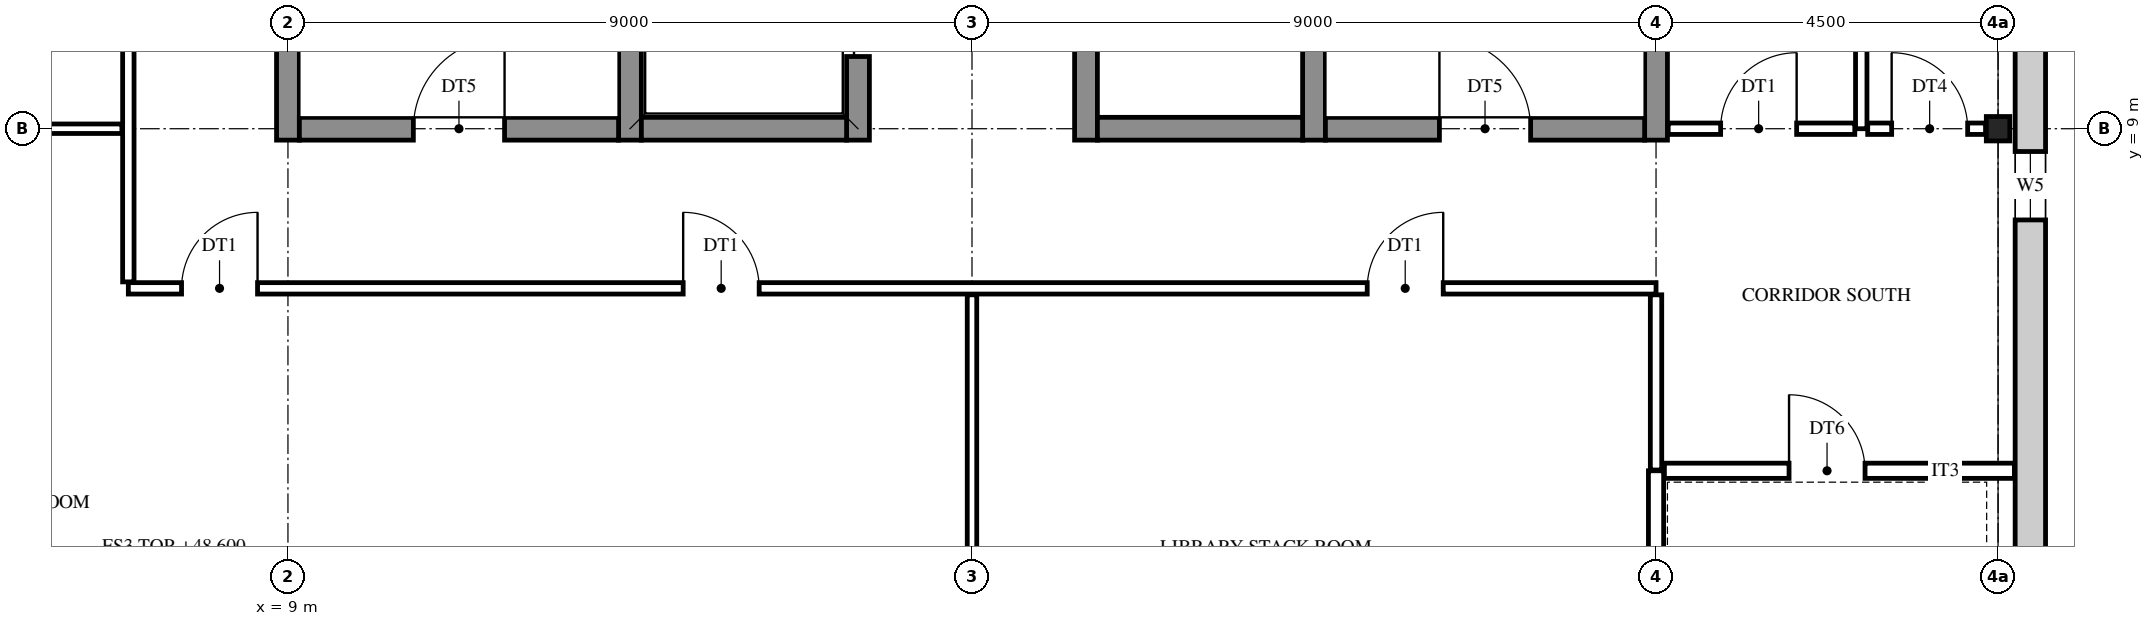
"""IFC4 building model, lengths in metres.
Left out: names, types, materials, properties, quantities, classifications, styles, units other than length and angle.
Written with IfcOpenShell. Run it as: python <this file> out.ifc"""

import sys

from ifc_helpers import new_model, si_unit, direction, frame, frame_2d, origin, origin_2d, place, context, subcontext, project, spatial, rectangle, i_section, extrude, element, fill, save


model = new_model("IFC4")
c1 = context("Model", 3, precision=1e-05, world=origin(), true_north=direction((0.0, 1.0)))
c2 = subcontext(c1, "Body", "Model", "MODEL_VIEW")
j1 = project(units=[si_unit("LENGTHUNIT", "METRE"), si_unit("PLANEANGLEUNIT", "RADIAN")], contexts=[c1])
p1 = place(None, origin())
s1 = spatial("IfcSite", under=j1, at=p1, CompositionType="ELEMENT")
p2 = place(p1, origin())
s2 = spatial("IfcBuilding", under=s1, at=p2, CompositionType="ELEMENT")
p3 = place(p2, frame((0.0, 0.0, 48.6)))
s3 = spatial("IfcBuildingStorey", under=s2, at=p3, CompositionType="ELEMENT", Elevation=48.6)
p4 = place(p3, frame((31.5, 9.0, 0.0), z_axis=(0.0, 0.0, 1.0), x_axis=(1.0, 0.0, 0.0)))
e1 = element("IfcColumn", 1, at=p4, inside=s3, PredefinedType="COLUMN", context=c2, shape_type="SweptSolid", body=[
    extrude(i_section(OverallWidth=0.309, OverallDepth=0.321, WebThickness=0.014, FlangeThickness=0.022, FilletRadius=0.017, at=origin_2d()), origin(), (0.0, 0.0, 1.0), 4.2),
])
for number, where, z_axis, x_axis in (
    (2, (9.0, 8.85, 0.0), (0.0, 0.0, 1.0), (0.0, 1.0, 0.0)),
    (3, (13.5, 8.85, 0.0), (0.0, 0.0, 1.0), (0.0, 1.0, 0.0)),
):
    element("IfcWall", number, at=place(p3, frame(where, z_axis=z_axis, x_axis=x_axis)), inside=s3, PredefinedType="SHEAR", context=c2, shape_type="SweptSolid", body=[
        extrude(rectangle(XDim=9.3, YDim=0.3, at=frame_2d((4.65, 0.0))), origin(), (0.0, 0.0, 1.0), 4.2),
    ])
p5 = place(p3, frame((16.5, 8.85, 0.0), z_axis=(0.0, 0.0, 1.0), x_axis=(0.0, 1.0, 0.0)))
e4 = element("IfcWall", 4, at=p5, inside=s3, PredefinedType="SHEAR", context=c2, shape_type="SweptSolid", body=[
    extrude(rectangle(XDim=9.3, YDim=0.3, at=frame_2d((4.65, 0.0))), origin(), (0.0, 0.0, 1.0), 4.2),
])
p6 = place(p5, frame((1.1, 0.0, 0.0)))
e5 = element("IfcOpeningElement", 5, at=p6, cuts=e4, PredefinedType="OPENING", context=c2, shape_type="SweptSolid", body=[
    extrude(rectangle(XDim=1.1, YDim=2.1, at=frame_2d((0.55, 1.05))), frame((0.0, 0.16, 0.0), z_axis=(0.0, -1.0, 0.0), x_axis=(1.0, 0.0, 0.0)), (0.0, 0.0, 1.0), 0.32),
])
p7 = place(p5, frame((4.1, 0.0, 0.0)))
e6 = element("IfcOpeningElement", 6, at=p7, cuts=e4, PredefinedType="OPENING", context=c2, shape_type="SweptSolid", body=[
    extrude(rectangle(XDim=1.1, YDim=2.1, at=frame_2d((0.55, 1.05))), frame((0.0, 0.16, 0.0), z_axis=(0.0, -1.0, 0.0), x_axis=(1.0, 0.0, 0.0)), (0.0, 0.0, 1.0), 0.32),
])
p8 = place(p3, frame((19.5, 8.85, 0.0), z_axis=(0.0, 0.0, 1.0), x_axis=(0.0, 1.0, 0.0)))
e7 = element("IfcWall", 7, at=p8, inside=s3, PredefinedType="SHEAR", context=c2, shape_type="SweptSolid", body=[
    extrude(rectangle(XDim=9.3, YDim=0.3, at=frame_2d((4.65, 0.0))), origin(), (0.0, 0.0, 1.0), 4.2),
])
p9 = place(p8, frame((3.95, 0.0, 0.0)))
e8 = element("IfcOpeningElement", 8, at=p9, cuts=e7, PredefinedType="OPENING", context=c2, shape_type="SweptSolid", body=[
    extrude(rectangle(XDim=1.4, YDim=2.1, at=frame_2d((0.7, 1.05))), frame((0.0, 0.16, 0.0), z_axis=(0.0, -1.0, 0.0), x_axis=(1.0, 0.0, 0.0)), (0.0, 0.0, 1.0), 0.32),
])
p10 = place(p8, frame((7.1, 0.0, 0.0)))
e9 = element("IfcOpeningElement", 9, at=p10, cuts=e7, PredefinedType="OPENING", context=c2, shape_type="SweptSolid", body=[
    extrude(rectangle(XDim=1.1, YDim=2.1, at=frame_2d((0.55, 1.05))), frame((0.0, 0.16, 0.0), z_axis=(0.0, -1.0, 0.0), x_axis=(1.0, 0.0, 0.0)), (0.0, 0.0, 1.0), 0.32),
])
for number, where, z_axis, x_axis in (
    (10, (22.5, 8.85, 0.0), (0.0, 0.0, 1.0), (0.0, 1.0, 0.0)),
    (11, (27.0, 8.85, 0.0), (0.0, 0.0, 1.0), (0.0, 1.0, 0.0)),
):
    element("IfcWall", number, at=place(p3, frame(where, z_axis=z_axis, x_axis=x_axis)), inside=s3, PredefinedType="SHEAR", context=c2, shape_type="SweptSolid", body=[
        extrude(rectangle(XDim=9.3, YDim=0.3, at=frame_2d((4.65, 0.0))), origin(), (0.0, 0.0, 1.0), 4.2),
    ])
p11 = place(p3, frame((9.15, 9.0, 0.0), z_axis=(0.0, 0.0, 1.0), x_axis=(1.0, 0.0, 0.0)))
e12 = element("IfcWall", 12, at=p11, inside=s3, PredefinedType="SHEAR", context=c2, shape_type="SweptSolid", body=[
    extrude(rectangle(XDim=4.2, YDim=0.3, at=frame_2d((2.1, 0.0))), origin(), (0.0, 0.0, 1.0), 4.2),
])
p12 = place(p11, frame((1.5, 0.0, 0.0)))
e13 = element("IfcOpeningElement", 13, at=p12, cuts=e12, PredefinedType="OPENING", context=c2, shape_type="SweptSolid", body=[
    extrude(rectangle(XDim=1.2, YDim=2.1, at=frame_2d((0.6, 1.05))), frame((0.0, 0.16, 0.0), z_axis=(0.0, -1.0, 0.0), x_axis=(1.0, 0.0, 0.0)), (0.0, 0.0, 1.0), 0.32),
])
for number, where, z_axis, x_axis in (
    (14, (13.65, 9.0, 0.0), (0.0, 0.0, 1.0), (1.0, 0.0, 0.0)),
    (15, (19.65, 9.0, 0.0), (0.0, 0.0, 1.0), (1.0, 0.0, 0.0)),
):
    element("IfcWall", number, at=place(p3, frame(where, z_axis=z_axis, x_axis=x_axis)), inside=s3, PredefinedType="SHEAR", context=c2, shape_type="SweptSolid", body=[
        extrude(rectangle(XDim=2.7, YDim=0.3, at=frame_2d((1.35, 0.0))), origin(), (0.0, 0.0, 1.0), 4.2),
    ])
p13 = place(p3, frame((22.65, 9.0, 0.0), z_axis=(0.0, 0.0, 1.0), x_axis=(1.0, 0.0, 0.0)))
e16 = element("IfcWall", 16, at=p13, inside=s3, PredefinedType="SHEAR", context=c2, shape_type="SweptSolid", body=[
    extrude(rectangle(XDim=4.2, YDim=0.3, at=frame_2d((2.1, 0.0))), origin(), (0.0, 0.0, 1.0), 4.2),
])
p14 = place(p13, frame((1.5, 0.0, 0.0)))
e17 = element("IfcOpeningElement", 17, at=p14, cuts=e16, PredefinedType="OPENING", context=c2, shape_type="SweptSolid", body=[
    extrude(rectangle(XDim=1.2, YDim=2.1, at=frame_2d((0.6, 1.05))), frame((0.0, 0.16, 0.0), z_axis=(0.0, -1.0, 0.0), x_axis=(1.0, 0.0, 0.0)), (0.0, 0.0, 1.0), 0.32),
])
p15 = place(p3, frame((31.925, 27.225, 0.0), z_axis=(0.0, 0.0, 1.0), x_axis=(0.0, -1.0, 0.0)))
e18 = element("IfcWall", 18, at=p15, inside=s3, PredefinedType="STANDARD", context=c2, shape_type="SweptSolid", body=[
    extrude(rectangle(XDim=27.45, YDim=0.4, at=frame_2d((13.725, 0.0))), origin(), (0.0, 0.0, 1.0), 4.2),
])
p16 = place(p15, frame((26.025, 0.0, 0.9)))
e19 = element("IfcOpeningElement", 19, at=p16, cuts=e18, PredefinedType="OPENING", context=c2, shape_type="SweptSolid", body=[
    extrude(rectangle(XDim=0.9, YDim=2.0, at=frame_2d((0.45, 1.0))), frame((0.0, 0.21, 0.0), z_axis=(0.0, -1.0, 0.0), x_axis=(1.0, 0.0, 0.0)), (0.0, 0.0, 1.0), 0.42),
])
p17 = place(p15, frame((18.525, 0.0, 0.9)))
e20 = element("IfcOpeningElement", 20, at=p17, cuts=e18, PredefinedType="OPENING", context=c2, shape_type="SweptSolid", body=[
    extrude(rectangle(XDim=0.9, YDim=2.0, at=frame_2d((0.45, 1.0))), frame((0.0, 0.21, 0.0), z_axis=(0.0, -1.0, 0.0), x_axis=(1.0, 0.0, 0.0)), (0.0, 0.0, 1.0), 0.42),
])
p18 = place(p15, frame((15.675, 0.0, 1.6)))
e21 = element("IfcOpeningElement", 21, at=p18, cuts=e18, PredefinedType="OPENING", context=c2, shape_type="SweptSolid", body=[
    extrude(rectangle(XDim=0.6, YDim=0.9, at=frame_2d((0.3, 0.45))), frame((0.0, 0.21, 0.0), z_axis=(0.0, -1.0, 0.0), x_axis=(1.0, 0.0, 0.0)), (0.0, 0.0, 1.0), 0.42),
])
p19 = place(p15, frame((11.175, 0.0, 1.6)))
e22 = element("IfcOpeningElement", 22, at=p19, cuts=e18, PredefinedType="OPENING", context=c2, shape_type="SweptSolid", body=[
    extrude(rectangle(XDim=0.6, YDim=0.9, at=frame_2d((0.3, 0.45))), frame((0.0, 0.21, 0.0), z_axis=(0.0, -1.0, 0.0), x_axis=(1.0, 0.0, 0.0)), (0.0, 0.0, 1.0), 0.42),
])
p20 = place(p15, frame((8.025, 0.0, 0.9)))
e23 = element("IfcOpeningElement", 23, at=p20, cuts=e18, PredefinedType="OPENING", context=c2, shape_type="SweptSolid", body=[
    extrude(rectangle(XDim=0.9, YDim=2.0, at=frame_2d((0.45, 1.0))), frame((0.0, 0.21, 0.0), z_axis=(0.0, -1.0, 0.0), x_axis=(1.0, 0.0, 0.0)), (0.0, 0.0, 1.0), 0.42),
])
p21 = place(p15, frame((0.525, 0.0, 0.9)))
e24 = element("IfcOpeningElement", 24, at=p21, cuts=e18, PredefinedType="OPENING", context=c2, shape_type="SweptSolid", body=[
    extrude(rectangle(XDim=0.9, YDim=2.0, at=frame_2d((0.45, 1.0))), frame((0.0, 0.21, 0.0), z_axis=(0.0, -1.0, 0.0), x_axis=(1.0, 0.0, 0.0)), (0.0, 0.0, 1.0), 0.42),
])
p22 = place(p3, frame((6.9, 6.985, 0.0), z_axis=(0.0, 0.0, 1.0), x_axis=(0.0, 1.0, 0.0)))
e25 = element("IfcWall", 25, at=p22, inside=s3, PredefinedType="PARTITIONING", context=c2, shape_type="SweptSolid", body=[
    extrude(rectangle(XDim=13.03, YDim=0.15, at=frame_2d((6.515, 0.0))), origin(), (0.0, 0.0, 1.0), 3.542),
])
p23 = place(p22, frame((5.965, 0.0, 0.0)))
e26 = element("IfcOpeningElement", 26, at=p23, cuts=e25, PredefinedType="OPENING", context=c2, shape_type="SweptSolid", body=[
    extrude(rectangle(XDim=1.1, YDim=2.1, at=frame_2d((0.55, 1.05))), frame((0.0, 0.085, 0.0), z_axis=(0.0, -1.0, 0.0), x_axis=(1.0, 0.0, 0.0)), (0.0, 0.0, 1.0), 0.17),
])
p24 = place(p3, frame((18.0, 0.17, 0.0), z_axis=(0.0, 0.0, 1.0), x_axis=(0.0, 1.0, 0.0)))
e27 = element("IfcWall", 27, at=p24, inside=s3, PredefinedType="PARTITIONING", context=c2, shape_type="SweptSolid", body=[
    extrude(rectangle(XDim=6.645, YDim=0.125, at=frame_2d((3.322, 0.0))), origin(), (0.0, 0.0, 1.0), 3.542),
])
p25 = place(p3, frame((27.0, 0.17, 0.0), z_axis=(0.0, 0.0, 1.0), x_axis=(0.0, 1.0, 0.0)))
e28 = element("IfcWall", 28, at=p25, inside=s3, PredefinedType="PARTITIONING", context=c2, shape_type="SweptSolid", body=[
    extrude(rectangle(XDim=4.33, YDim=0.2, at=frame_2d((2.165, 0.0))), origin(), (0.0, 0.0, 1.0), 3.542),
])
p26 = place(p3, frame((27.0, 4.51, 0.0), z_axis=(0.0, 0.0, 1.0), x_axis=(0.0, 1.0, 0.0)))
e29 = element("IfcWall", 29, at=p26, inside=s3, PredefinedType="PARTITIONING", context=c2, shape_type="SweptSolid", body=[
    extrude(rectangle(XDim=2.305, YDim=0.15, at=frame_2d((1.152, 0.0))), origin(), (0.0, 0.0, 1.0), 3.542),
])
p27 = place(p3, frame((29.7, 9.0, 0.0), z_axis=(0.0, 0.0, 1.0), x_axis=(0.0, 1.0, 0.0)))
e30 = element("IfcWall", 30, at=p27, inside=s3, PredefinedType="PARTITIONING", context=c2, shape_type="SweptSolid", body=[
    extrude(rectangle(XDim=6.3, YDim=0.15, at=frame_2d((3.15, 0.0))), origin(), (0.0, 0.0, 1.0), 3.542),
])
p28 = place(p27, frame((4.0, 0.0, 0.0)))
e31 = element("IfcOpeningElement", 31, at=p28, cuts=e30, PredefinedType="OPENING", context=c2, shape_type="SweptSolid", body=[
    extrude(rectangle(XDim=1.0, YDim=2.1, at=frame_2d((0.5, 1.05))), frame((0.0, 0.085, 0.0), z_axis=(0.0, -1.0, 0.0), x_axis=(1.0, 0.0, 0.0)), (0.0, 0.0, 1.0), 0.17),
])
p29 = place(p3, frame((27.11, 4.5, 0.0), z_axis=(0.0, 0.0, 1.0), x_axis=(1.0, 0.0, 0.0)))
e32 = element("IfcWall", 32, at=p29, inside=s3, PredefinedType="PARTITIONING", context=c2, shape_type="SweptSolid", body=[
    extrude(rectangle(XDim=4.605, YDim=0.2, at=frame_2d((2.302, 0.0))), origin(), (0.0, 0.0, 1.0), 3.542),
])
p30 = place(p29, frame((1.64, 0.0, 0.0)))
e33 = element("IfcOpeningElement", 33, at=p30, cuts=e32, PredefinedType="OPENING", context=c2, shape_type="SweptSolid", body=[
    extrude(rectangle(XDim=1.0, YDim=2.1, at=frame_2d((0.5, 1.05))), frame((0.0, 0.11, 0.0), z_axis=(0.0, -1.0, 0.0), x_axis=(1.0, 0.0, 0.0)), (0.0, 0.0, 1.0), 0.22),
])
p31 = place(p3, frame((6.9, 6.9, 0.0), z_axis=(0.0, 0.0, 1.0), x_axis=(1.0, 0.0, 0.0)))
e34 = element("IfcWall", 34, at=p31, inside=s3, PredefinedType="PARTITIONING", context=c2, shape_type="SweptSolid", body=[
    extrude(rectangle(XDim=20.1, YDim=0.15, at=frame_2d((10.05, 0.0))), origin(), (0.0, 0.0, 1.0), 3.542),
])
p32 = place(p31, frame((0.7, 0.0, 0.0)))
e35 = element("IfcOpeningElement", 35, at=p32, cuts=e34, PredefinedType="OPENING", context=c2, shape_type="SweptSolid", body=[
    extrude(rectangle(XDim=1.0, YDim=2.1, at=frame_2d((0.5, 1.05))), frame((0.0, 0.085, 0.0), z_axis=(0.0, -1.0, 0.0), x_axis=(1.0, 0.0, 0.0)), (0.0, 0.0, 1.0), 0.17),
])
p33 = place(p31, frame((7.3, 0.0, 0.0)))
e36 = element("IfcOpeningElement", 36, at=p33, cuts=e34, PredefinedType="OPENING", context=c2, shape_type="SweptSolid", body=[
    extrude(rectangle(XDim=1.0, YDim=2.1, at=frame_2d((0.5, 1.05))), frame((0.0, 0.085, 0.0), z_axis=(0.0, -1.0, 0.0), x_axis=(1.0, 0.0, 0.0)), (0.0, 0.0, 1.0), 0.17),
])
p34 = place(p31, frame((16.3, 0.0, 0.0)))
e37 = element("IfcOpeningElement", 37, at=p34, cuts=e34, PredefinedType="OPENING", context=c2, shape_type="SweptSolid", body=[
    extrude(rectangle(XDim=1.0, YDim=2.1, at=frame_2d((0.5, 1.05))), frame((0.0, 0.085, 0.0), z_axis=(0.0, -1.0, 0.0), x_axis=(1.0, 0.0, 0.0)), (0.0, 0.0, 1.0), 0.17),
])
p35 = place(p3, frame((0.165, 9.0, 0.0), z_axis=(0.0, 0.0, 1.0), x_axis=(1.0, 0.0, 0.0)))
e38 = element("IfcWall", 38, at=p35, inside=s3, PredefinedType="PARTITIONING", context=c2, shape_type="SweptSolid", body=[
    extrude(rectangle(XDim=6.65, YDim=0.125, at=frame_2d((3.325, 0.0))), origin(), (0.0, 0.0, 1.0), 3.542),
])
p36 = place(p3, frame((27.16, 9.0, 0.0), z_axis=(0.0, 0.0, 1.0), x_axis=(1.0, 0.0, 0.0)))
e39 = element("IfcWall", 39, at=p36, inside=s3, PredefinedType="PARTITIONING", context=c2, shape_type="SweptSolid", body=[
    extrude(rectangle(XDim=2.455, YDim=0.15, at=frame_2d((1.228, 0.0))), origin(), (0.0, 0.0, 1.0), 3.542),
])
p37 = place(p36, frame((0.69, 0.0, 0.0)))
e40 = element("IfcOpeningElement", 40, at=p37, cuts=e39, PredefinedType="OPENING", context=c2, shape_type="SweptSolid", body=[
    extrude(rectangle(XDim=1.0, YDim=2.1, at=frame_2d((0.5, 1.05))), frame((0.0, 0.085, 0.0), z_axis=(0.0, -1.0, 0.0), x_axis=(1.0, 0.0, 0.0)), (0.0, 0.0, 1.0), 0.17),
])
p38 = place(p3, frame((29.785, 9.0, 0.0), z_axis=(0.0, 0.0, 1.0), x_axis=(1.0, 0.0, 0.0)))
e41 = element("IfcWall", 41, at=p38, inside=s3, PredefinedType="PARTITIONING", context=c2, shape_type="SweptSolid", body=[
    extrude(rectangle(XDim=1.551, YDim=0.15, at=frame_2d((0.775, 0.0))), origin(), (0.0, 0.0, 1.0), 3.542),
])
p39 = place(p38, frame((0.315, 0.0, 0.0)))
e42 = element("IfcOpeningElement", 42, at=p39, cuts=e41, PredefinedType="OPENING", context=c2, shape_type="SweptSolid", body=[
    extrude(rectangle(XDim=1.0, YDim=2.1, at=frame_2d((0.5, 1.05))), frame((0.0, 0.085, 0.0), z_axis=(0.0, -1.0, 0.0), x_axis=(1.0, 0.0, 0.0)), (0.0, 0.0, 1.0), 0.17),
])
p40 = place(p17, origin())
e43 = element("IfcWindow", 43, at=p40, inside=s3, PartitioningType="SINGLE_PANEL", PredefinedType="WINDOW", context=c2, shape_type="SweptSolid", body=[
    extrude(rectangle(XDim=0.9, YDim=2.0, at=frame_2d((0.45, 1.0))), frame((0.0, 0.03, 0.0), z_axis=(0.0, -1.0, 0.0), x_axis=(1.0, 0.0, 0.0)), (0.0, 0.0, 1.0), 0.06),
])
fill(e20, e43)
p41 = place(p12, origin())
e44 = element("IfcDoor", 44, at=p41, inside=s3, OperationType="SINGLE_SWING_RIGHT", PredefinedType="DOOR", context=c2, shape_type="SweptSolid", body=[
    extrude(rectangle(XDim=1.2, YDim=2.1, at=frame_2d((0.6, 1.05))), frame((0.0, 0.025, 0.0), z_axis=(0.0, -1.0, 0.0), x_axis=(1.0, 0.0, 0.0)), (0.0, 0.0, 1.0), 0.05),
])
fill(e13, e44)
p42 = place(p14, origin())
e45 = element("IfcDoor", 45, at=p42, inside=s3, OperationType="SINGLE_SWING_LEFT", PredefinedType="DOOR", context=c2, shape_type="SweptSolid", body=[
    extrude(rectangle(XDim=1.2, YDim=2.1, at=frame_2d((0.6, 1.05))), frame((0.0, 0.025, 0.0), z_axis=(0.0, -1.0, 0.0), x_axis=(1.0, 0.0, 0.0)), (0.0, 0.0, 1.0), 0.05),
])
fill(e17, e45)
p43 = place(p37, origin())
e46 = element("IfcDoor", 46, at=p43, inside=s3, OperationType="SINGLE_SWING_RIGHT", PredefinedType="DOOR", context=c2, shape_type="SweptSolid", body=[
    extrude(rectangle(XDim=1.0, YDim=2.1, at=frame_2d((0.5, 1.05))), frame((0.0, 0.025, 0.0), z_axis=(0.0, -1.0, 0.0), x_axis=(1.0, 0.0, 0.0)), (0.0, 0.0, 1.0), 0.05),
])
fill(e40, e46)
p44 = place(p39, origin())
e47 = element("IfcDoor", 47, at=p44, inside=s3, OperationType="SINGLE_SWING_LEFT", PredefinedType="DOOR", context=c2, shape_type="SweptSolid", body=[
    extrude(rectangle(XDim=1.0, YDim=2.1, at=frame_2d((0.5, 1.05))), frame((0.0, 0.025, 0.0), z_axis=(0.0, -1.0, 0.0), x_axis=(1.0, 0.0, 0.0)), (0.0, 0.0, 1.0), 0.05),
])
fill(e42, e47)
p45 = place(p30, frame((1.0, 0.0, 0.0), z_axis=(0.0, 0.0, 1.0), x_axis=(-1.0, 0.0, 0.0)))
e48 = element("IfcDoor", 48, at=p45, inside=s3, OperationType="SINGLE_SWING_LEFT", PredefinedType="DOOR", context=c2, shape_type="SweptSolid", body=[
    extrude(rectangle(XDim=1.0, YDim=2.1, at=frame_2d((0.5, 1.05))), frame((0.0, 0.025, 0.0), z_axis=(0.0, -1.0, 0.0), x_axis=(1.0, 0.0, 0.0)), (0.0, 0.0, 1.0), 0.05),
])
fill(e33, e48)
p46 = place(p32, frame((1.0, 0.0, 0.0), z_axis=(0.0, 0.0, 1.0), x_axis=(-1.0, 0.0, 0.0)))
e49 = element("IfcDoor", 49, at=p46, inside=s3, OperationType="SINGLE_SWING_RIGHT", PredefinedType="DOOR", context=c2, shape_type="SweptSolid", body=[
    extrude(rectangle(XDim=1.0, YDim=2.1, at=frame_2d((0.5, 1.05))), frame((0.0, 0.025, 0.0), z_axis=(0.0, -1.0, 0.0), x_axis=(1.0, 0.0, 0.0)), (0.0, 0.0, 1.0), 0.05),
])
fill(e35, e49)
p47 = place(p33, frame((1.0, 0.0, 0.0), z_axis=(0.0, 0.0, 1.0), x_axis=(-1.0, 0.0, 0.0)))
e50 = element("IfcDoor", 50, at=p47, inside=s3, OperationType="SINGLE_SWING_LEFT", PredefinedType="DOOR", context=c2, shape_type="SweptSolid", body=[
    extrude(rectangle(XDim=1.0, YDim=2.1, at=frame_2d((0.5, 1.05))), frame((0.0, 0.025, 0.0), z_axis=(0.0, -1.0, 0.0), x_axis=(1.0, 0.0, 0.0)), (0.0, 0.0, 1.0), 0.05),
])
fill(e36, e50)
p48 = place(p34, frame((1.0, 0.0, 0.0), z_axis=(0.0, 0.0, 1.0), x_axis=(-1.0, 0.0, 0.0)))
e51 = element("IfcDoor", 51, at=p48, inside=s3, OperationType="SINGLE_SWING_RIGHT", PredefinedType="DOOR", context=c2, shape_type="SweptSolid", body=[
    extrude(rectangle(XDim=1.0, YDim=2.1, at=frame_2d((0.5, 1.05))), frame((0.0, 0.025, 0.0), z_axis=(0.0, -1.0, 0.0), x_axis=(1.0, 0.0, 0.0)), (0.0, 0.0, 1.0), 0.05),
])
fill(e37, e51)
p49 = place(p6, origin())
e52 = element("IfcDoor", 52, at=p49, inside=s3, OperationType="DOUBLE_DOOR_SLIDING", PredefinedType="DOOR", context=c2, shape_type="SweptSolid", body=[
    extrude(rectangle(XDim=1.1, YDim=2.1, at=frame_2d((0.55, 1.05))), frame((0.0, 0.025, 0.0), z_axis=(0.0, -1.0, 0.0), x_axis=(1.0, 0.0, 0.0)), (0.0, 0.0, 1.0), 0.05),
])
fill(e5, e52)
save(model, sys.argv[1])
